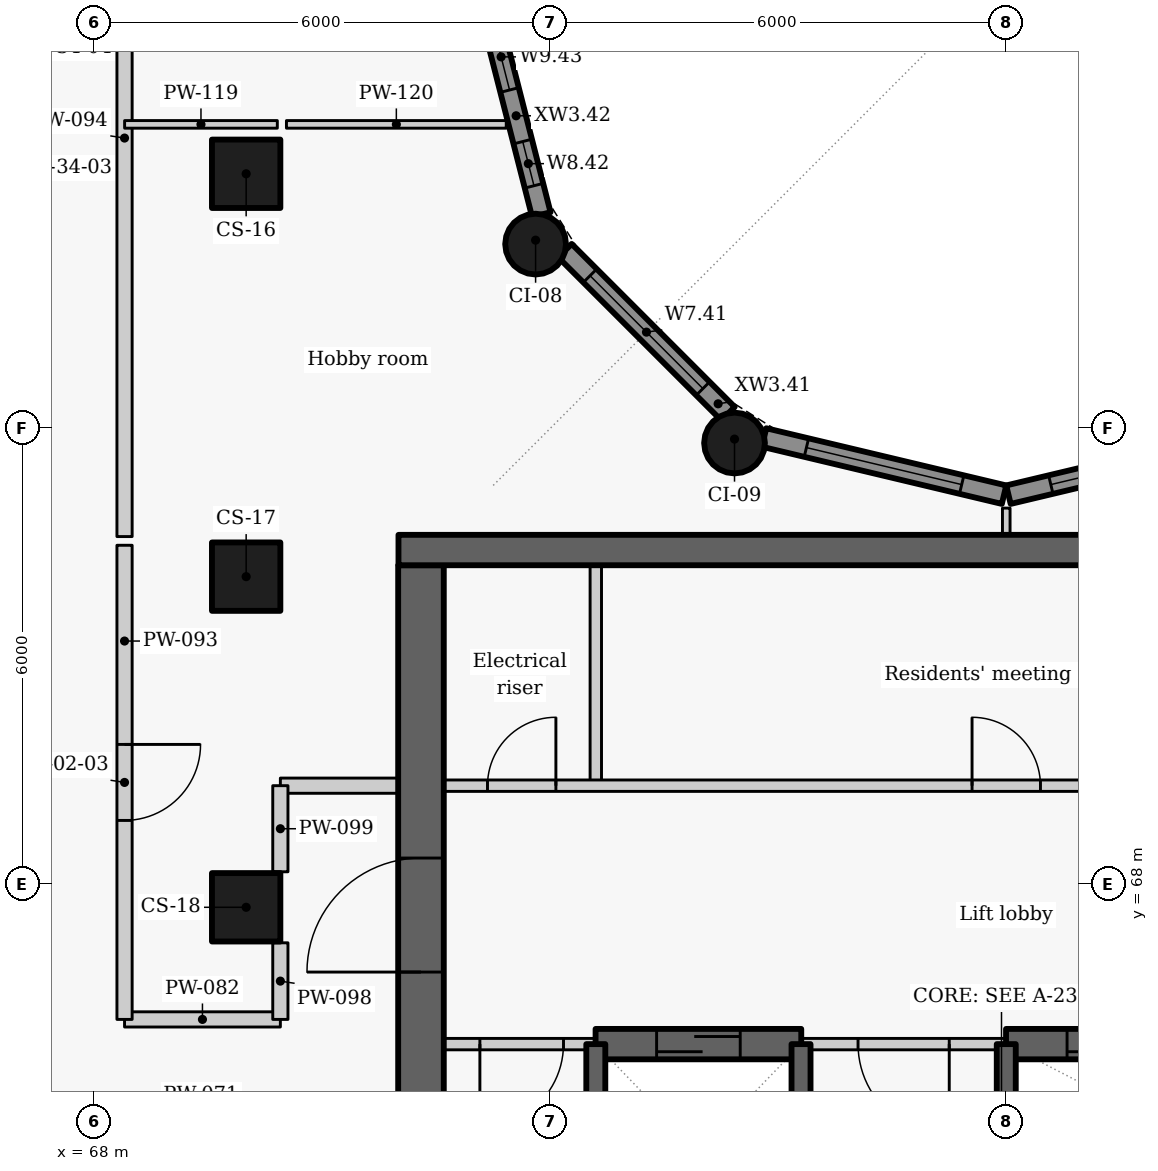
"""IFC4 building model, lengths in metres.
Left out: names, types, materials, properties, quantities, classifications, styles, units other than length and angle.
Written with IfcOpenShell. Run it as: python <this file> out.ifc"""

import sys

from ifc_helpers import new_model, si_unit, direction, frame, frame_2d, origin, origin_2d, place, context, subcontext, project, spatial, rectangle, circle, extrude, element, fill, save


model = new_model("IFC4")
c1 = context("Model", 3, precision=1e-05, world=origin(), true_north=direction((0.0, 1.0)))
c2 = subcontext(c1, "Body", "Model", "MODEL_VIEW")
j1 = project(units=[si_unit("LENGTHUNIT", "METRE"), si_unit("PLANEANGLEUNIT", "RADIAN")], contexts=[c1])
p1 = place(None, origin())
s1 = spatial("IfcSite", under=j1, at=p1, CompositionType="ELEMENT")
p2 = place(p1, origin())
s2 = spatial("IfcBuilding", under=s1, at=p2, CompositionType="ELEMENT")
p3 = place(p2, frame((0.0, 0.0, 216.3)))
s3 = spatial("IfcBuildingStorey", under=s2, at=p3, CompositionType="ELEMENT", Elevation=216.3)
for number, where, z_axis, x_axis in (
    (1, (70.0, 77.35, 0.0), (0.0, 0.0, 1.0), (0.0, -1.0, 0.0)),
    (2, (70.0, 72.05, 0.0), (0.0, 0.0, 1.0), (0.0, -1.0, 0.0)),
    (3, (70.0, 67.7, 0.0), (0.0, 0.0, 1.0), (0.0, -1.0, 0.0)),
):
    element("IfcColumn", number, at=place(p3, frame(where, z_axis=z_axis, x_axis=x_axis)), inside=s3, PredefinedType="COLUMN", context=c2, shape_type="SweptSolid", body=[
        extrude(rectangle(XDim=0.9, YDim=0.9, at=origin_2d()), origin(), (0.0, 0.0, 1.0), 3.3),
    ])
for number, where, z_axis, x_axis in (
    (4, (73.808, 76.425, 0.0), (0.0, 0.0, 1.0), (0.5, -0.866, 0.0)),
    (5, (76.425, 73.808, 0.0), (0.0, 0.0, 1.0), (0.866, -0.5, 0.0)),
):
    element("IfcColumn", number, at=place(p3, frame(where, z_axis=z_axis, x_axis=x_axis)), inside=s3, PredefinedType="COLUMN", context=c2, shape_type="SweptSolid", body=[
        extrude(circle(Radius=0.4, at=origin_2d()), origin(), (0.0, 0.0, 1.0), 3.3),
    ])
p4 = place(p3, frame((83.186, 73.881, 0.0), z_axis=(0.0, 0.0, 1.0), x_axis=(-0.972773113459, -0.231759508395, 0.0)))
e6 = element("IfcWall", 6, at=p4, inside=s3, PredefinedType="SOLIDWALL", context=c2, shape_type="SweptSolid", body=[
    extrude(rectangle(XDim=3.246, YDim=0.25, at=frame_2d((1.623, 0.0))), origin(), (0.0, 0.0, 1.0), 2.05),
])
p5 = place(p4, frame((0.573, 0.0, 0.9)))
e7 = element("IfcOpeningElement", 7, at=p5, cuts=e6, PredefinedType="OPENING", context=c2, shape_type="SweptSolid", body=[
    extrude(rectangle(XDim=2.1, YDim=1.1, at=frame_2d((1.05, 0.55))), frame((0.0, 0.135, 0.0), z_axis=(0.0, -1.0, 0.0), x_axis=(1.0, 0.0, 0.0)), (0.0, 0.0, 1.0), 0.27),
])
p6 = place(p3, frame((79.971, 73.128, 0.0), z_axis=(0.0, 0.0, 1.0), x_axis=(-0.972773113459, 0.231759508395, 0.0)))
e8 = element("IfcWall", 8, at=p6, inside=s3, PredefinedType="SOLIDWALL", context=c2, shape_type="SweptSolid", body=[
    extrude(rectangle(XDim=3.246, YDim=0.25, at=frame_2d((1.623, 0.0))), origin(), (0.0, 0.0, 1.0), 2.05),
])
p7 = place(p6, frame((0.573, 0.0, 0.9)))
e9 = element("IfcOpeningElement", 9, at=p7, cuts=e8, PredefinedType="OPENING", context=c2, shape_type="SweptSolid", body=[
    extrude(rectangle(XDim=2.1, YDim=1.1, at=frame_2d((1.05, 0.55))), frame((0.0, 0.135, 0.0), z_axis=(0.0, -1.0, 0.0), x_axis=(1.0, 0.0, 0.0)), (0.0, 0.0, 1.0), 0.27),
])
p8 = place(p3, frame((76.339, 74.194, 0.0), z_axis=(0.0, 0.0, 1.0), x_axis=(-0.707106781187, 0.707106781187, 0.0)))
e10 = element("IfcWall", 10, at=p8, inside=s3, PredefinedType="SOLIDWALL", context=c2, shape_type="SweptSolid", body=[
    extrude(rectangle(XDim=3.033, YDim=0.25, at=frame_2d((1.517, 0.0))), origin(), (0.0, 0.0, 1.0), 2.05),
])
p9 = place(p8, frame((0.467, 0.0, 0.9)))
e11 = element("IfcOpeningElement", 11, at=p9, cuts=e10, PredefinedType="OPENING", context=c2, shape_type="SweptSolid", body=[
    extrude(rectangle(XDim=2.1, YDim=1.1, at=frame_2d((1.05, 0.55))), frame((0.0, 0.135, 0.0), z_axis=(0.0, -1.0, 0.0), x_axis=(1.0, 0.0, 0.0)), (0.0, 0.0, 1.0), 0.27),
])
p10 = place(p3, frame((73.883, 76.813, 0.0), z_axis=(0.0, 0.0, 1.0), x_axis=(-0.247055971283, 0.969001211069, 0.0)))
e12 = element("IfcWall", 12, at=p10, inside=s3, PredefinedType="SOLIDWALL", context=c2, shape_type="SweptSolid", body=[
    extrude(rectangle(XDim=3.01, YDim=0.25, at=frame_2d((1.505, 0.0))), origin(), (0.0, 0.0, 1.0), 2.05),
])
p11 = place(p10, frame((0.392, 0.0, 0.9)))
e13 = element("IfcOpeningElement", 13, at=p11, cuts=e12, PredefinedType="OPENING", context=c2, shape_type="SweptSolid", body=[
    extrude(rectangle(XDim=0.6, YDim=1.1, at=frame_2d((0.3, 0.55))), frame((0.0, 0.135, 0.0), z_axis=(0.0, -1.0, 0.0), x_axis=(1.0, 0.0, 0.0)), (0.0, 0.0, 1.0), 0.27),
])
p12 = place(p10, frame((1.691, 0.0, 0.9)))
e14 = element("IfcOpeningElement", 14, at=p12, cuts=e12, PredefinedType="OPENING", context=c2, shape_type="SweptSolid", body=[
    extrude(rectangle(XDim=0.9, YDim=1.1, at=frame_2d((0.45, 0.55))), frame((0.0, 0.135, 0.0), z_axis=(0.0, -1.0, 0.0), x_axis=(1.0, 0.0, 0.0)), (0.0, 0.0, 1.0), 0.27),
])
p13 = place(p3, frame((74.6, 69.3, 0.0), z_axis=(0.0, 0.0, 1.0), x_axis=(0.0, 1.0, 0.0)))
e15 = element("IfcWall", 15, at=p13, inside=s3, PredefinedType="PARTITIONING", context=c2, shape_type="SweptSolid", body=[
    extrude(rectangle(XDim=2.9, YDim=0.15, at=frame_2d((1.45, 0.0))), origin(), (0.0, 0.0, 1.0), 2.95),
])
p14 = place(p3, frame((72.0, 69.3, 0.0), z_axis=(0.0, 0.0, 1.0), x_axis=(1.0, 0.0, 0.0)))
e16 = element("IfcWall", 16, at=p14, inside=s3, PredefinedType="PARTITIONING", context=c2, shape_type="SweptSolid", body=[
    extrude(rectangle(XDim=13.4, YDim=0.15, at=frame_2d((6.7, 0.0))), origin(), (0.0, 0.0, 1.0), 2.95),
])
p15 = place(p14, frame((1.175, 0.0, 0.0)))
e17 = element("IfcOpeningElement", 17, at=p15, cuts=e16, PredefinedType="OPENING", context=c2, shape_type="SweptSolid", body=[
    extrude(rectangle(XDim=0.9, YDim=2.1, at=frame_2d((0.45, 1.05))), frame((0.0, 0.085, 0.0), z_axis=(0.0, -1.0, 0.0), x_axis=(1.0, 0.0, 0.0)), (0.0, 0.0, 1.0), 0.17),
])
p16 = place(p14, frame((7.55, 0.0, 0.0)))
e18 = element("IfcOpeningElement", 18, at=p16, cuts=e16, PredefinedType="OPENING", context=c2, shape_type="SweptSolid", body=[
    extrude(rectangle(XDim=0.9, YDim=2.1, at=frame_2d((0.45, 1.05))), frame((0.0, 0.085, 0.0), z_axis=(0.0, -1.0, 0.0), x_axis=(1.0, 0.0, 0.0)), (0.0, 0.0, 1.0), 0.17),
])
p17 = place(p3, frame((72.3, 63.1, -0.275), z_axis=(0.0, 0.0, 1.0), x_axis=(0.0, 1.0, 0.0)))
e19 = element("IfcWall", 19, at=p17, inside=s3, PredefinedType="SHEAR", context=c2, shape_type="SweptSolid", body=[
    extrude(rectangle(XDim=9.1, YDim=0.6, at=frame_2d((4.55, 0.0))), origin(), (0.0, 0.0, 1.0), 3.225),
])
p18 = place(p17, frame((3.748, 0.0, 0.275)))
e20 = element("IfcOpeningElement", 20, at=p18, cuts=e19, PredefinedType="OPENING", context=c2, shape_type="SweptSolid", body=[
    extrude(rectangle(XDim=1.5, YDim=2.1, at=frame_2d((0.75, 1.05))), frame((0.0, 0.31, 0.0), z_axis=(0.0, -1.0, 0.0), x_axis=(1.0, 0.0, 0.0)), (0.0, 0.0, 1.0), 0.62),
])
p19 = place(p3, frame((74.603, 65.9, 0.0), z_axis=(0.0, 0.0, 1.0), x_axis=(-1.0, 0.0, 0.0)))
e21 = element("IfcWall", 21, at=p19, inside=s3, PredefinedType="PARTITIONING", context=c2, shape_type="SweptSolid", body=[
    extrude(rectangle(XDim=2.603, YDim=0.15, at=frame_2d((1.302, 0.0))), origin(), (0.0, 0.0, 1.0), 2.95),
])
p20 = place(p19, frame((0.428, 0.0, 0.0)))
e22 = element("IfcOpeningElement", 22, at=p20, cuts=e21, PredefinedType="OPENING", context=c2, shape_type="SweptSolid", body=[
    extrude(rectangle(XDim=1.1, YDim=2.1, at=frame_2d((0.55, 1.05))), frame((0.0, 0.085, 0.0), z_axis=(0.0, -1.0, 0.0), x_axis=(1.0, 0.0, 0.0)), (0.0, 0.0, 1.0), 0.17),
])
p21 = place(p3, frame((80.003, 65.9, 0.0), z_axis=(0.0, 0.0, 1.0), x_axis=(-1.0, 0.0, 0.0)))
e23 = element("IfcWall", 23, at=p21, inside=s3, PredefinedType="PARTITIONING", context=c2, shape_type="SweptSolid", body=[
    extrude(rectangle(XDim=2.706, YDim=0.15, at=frame_2d((1.353, 0.0))), origin(), (0.0, 0.0, 1.0), 2.95),
])
p22 = place(p21, frame((0.753, 0.0, 0.0)))
e24 = element("IfcOpeningElement", 24, at=p22, cuts=e23, PredefinedType="OPENING", context=c2, shape_type="SweptSolid", body=[
    extrude(rectangle(XDim=1.2, YDim=2.1, at=frame_2d((0.6, 1.05))), frame((0.0, 0.085, 0.0), z_axis=(0.0, -1.0, 0.0), x_axis=(1.0, 0.0, 0.0)), (0.0, 0.0, 1.0), 0.17),
])
p23 = place(p3, frame((74.597, 65.9, -0.275), z_axis=(0.0, 0.0, 1.0), x_axis=(1.0, 0.0, 0.0)))
e25 = element("IfcWall", 25, at=p23, inside=s3, PredefinedType="SHEAR", context=c2, shape_type="SweptSolid", body=[
    extrude(rectangle(XDim=2.706, YDim=0.4, at=frame_2d((1.353, 0.0))), origin(), (0.0, 0.0, 1.0), 3.225),
])
p24 = place(p23, frame((0.803, 0.0, 0.275)))
e26 = element("IfcOpeningElement", 26, at=p24, cuts=e25, PredefinedType="OPENING", context=c2, shape_type="SweptSolid", body=[
    extrude(rectangle(XDim=1.1, YDim=2.1, at=frame_2d((0.55, 1.05))), frame((0.0, 0.21, 0.0), z_axis=(0.0, -1.0, 0.0), x_axis=(1.0, 0.0, 0.0)), (0.0, 0.0, 1.0), 0.42),
])
p25 = place(p3, frame((79.997, 65.9, -0.275), z_axis=(0.0, 0.0, 1.0), x_axis=(1.0, 0.0, 0.0)))
e27 = element("IfcWall", 27, at=p25, inside=s3, PredefinedType="SHEAR", context=c2, shape_type="SweptSolid", body=[
    extrude(rectangle(XDim=5.406, YDim=0.4, at=frame_2d((2.703, 0.0))), origin(), (0.0, 0.0, 1.0), 3.225),
])
p26 = place(p25, frame((0.803, 0.0, 0.275)))
e28 = element("IfcOpeningElement", 28, at=p26, cuts=e27, PredefinedType="OPENING", context=c2, shape_type="SweptSolid", body=[
    extrude(rectangle(XDim=1.1, YDim=2.1, at=frame_2d((0.55, 1.05))), frame((0.0, 0.21, 0.0), z_axis=(0.0, -1.0, 0.0), x_axis=(1.0, 0.0, 0.0)), (0.0, 0.0, 1.0), 0.42),
])
for number, where, z_axis, x_axis in (
    (29, (74.6, 63.1, -0.275), (0.0, 0.0, 1.0), (0.0, 1.0, 0.0)),
    (30, (77.3, 63.1, -0.275), (0.0, 0.0, 1.0), (0.0, 1.0, 0.0)),
    (31, (80.0, 63.1, -0.275), (0.0, 0.0, 1.0), (0.0, 1.0, 0.0)),
):
    element("IfcWall", number, at=place(p3, frame(where, z_axis=z_axis, x_axis=x_axis)), inside=s3, PredefinedType="SHEAR", context=c2, shape_type="SweptSolid", body=[
        extrude(rectangle(XDim=2.8, YDim=0.25, at=frame_2d((1.4, 0.0))), origin(), (0.0, 0.0, 1.0), 3.225),
    ])
p27 = place(p3, frame((70.45, 69.3, 0.0), z_axis=(0.0, 0.0, 1.0), x_axis=(1.0, 0.0, 0.0)))
e32 = element("IfcWall", 32, at=p27, inside=s3, PredefinedType="PARTITIONING", context=c2, shape_type="SweptSolid", body=[
    extrude(rectangle(XDim=1.55, YDim=0.2, at=frame_2d((0.775, 0.0))), origin(), (0.0, 0.0, 1.0), 2.95),
])
p28 = place(p3, frame((68.4, 66.225, 0.0), z_axis=(0.0, 0.0, 1.0), x_axis=(1.0, 0.0, 0.0)))
e33 = element("IfcWall", 33, at=p28, inside=s3, PredefinedType="PARTITIONING", context=c2, shape_type="SweptSolid", body=[
    extrude(rectangle(XDim=2.05, YDim=0.2, at=frame_2d((1.025, 0.0))), origin(), (0.0, 0.0, 1.0), 2.43),
])
p29 = place(p3, frame((68.4, 72.463, 0.0), z_axis=(0.0, 0.0, 1.0), x_axis=(0.0, -1.0, 0.0)))
e34 = element("IfcWall", 34, at=p29, inside=s3, PredefinedType="PARTITIONING", context=c2, shape_type="SweptSolid", body=[
    extrude(rectangle(XDim=6.238, YDim=0.2, at=frame_2d((3.119, 0.0))), origin(), (0.0, 0.0, 1.0), 2.95),
])
p30 = place(p29, frame((2.62, 0.0, 0.0)))
e35 = element("IfcOpeningElement", 35, at=p30, cuts=e34, PredefinedType="OPENING", context=c2, shape_type="SweptSolid", body=[
    extrude(rectangle(XDim=1.0, YDim=2.1, at=frame_2d((0.5, 1.05))), frame((0.0, 0.11, 0.0), z_axis=(0.0, -1.0, 0.0), x_axis=(1.0, 0.0, 0.0)), (0.0, 0.0, 1.0), 0.22),
])
p31 = place(p3, frame((68.4, 72.577, 0.0), z_axis=(0.0, 0.0, 1.0), x_axis=(0.0, 1.0, 0.0)))
e36 = element("IfcWall", 36, at=p31, inside=s3, PredefinedType="PARTITIONING", context=c2, shape_type="SweptSolid", body=[
    extrude(rectangle(XDim=10.486, YDim=0.2, at=frame_2d((5.243, 0.0))), origin(), (0.0, 0.0, 1.0), 2.95),
])
p32 = place(p3, frame((70.45, 66.225, 0.0), z_axis=(0.0, 0.0, 1.0), x_axis=(0.0, 1.0, 0.0)))
e37 = element("IfcWall", 37, at=p32, inside=s3, PredefinedType="PARTITIONING", context=c2, shape_type="SweptSolid", body=[
    extrude(rectangle(XDim=1.008, YDim=0.2, at=frame_2d((0.504, 0.0))), origin(), (0.0, 0.0, 1.0), 2.43),
])
p33 = place(p3, frame((70.45, 68.167, 0.0), z_axis=(0.0, 0.0, 1.0), x_axis=(0.0, 1.0, 0.0)))
e38 = element("IfcWall", 38, at=p33, inside=s3, PredefinedType="PARTITIONING", context=c2, shape_type="SweptSolid", body=[
    extrude(rectangle(XDim=1.133, YDim=0.2, at=frame_2d((0.566, 0.0))), origin(), (0.0, 0.0, 1.0), 2.43),
])
p34 = place(p3, frame((80.0, 72.6, 0.0), z_axis=(0.0, 0.0, 1.0), x_axis=(0.0, 1.0, 0.0)))
e39 = element("IfcWall", 39, at=p34, inside=s3, PredefinedType="PARTITIONING", context=c2, shape_type="SweptSolid", body=[
    extrude(rectangle(XDim=0.352, YDim=0.1, at=frame_2d((0.176, 0.0))), origin(), (0.0, 0.0, 1.0), 2.95),
])
p35 = place(p3, frame((68.401, 78.0, 0.0), z_axis=(0.0, 0.0, 1.0), x_axis=(1.0, 0.0, 0.0)))
e40 = element("IfcWall", 40, at=p35, inside=s3, PredefinedType="PARTITIONING", context=c2, shape_type="SweptSolid", body=[
    extrude(rectangle(XDim=2.009, YDim=0.1, at=frame_2d((1.004, 0.0))), origin(), (0.0, 0.0, 1.0), 2.43),
])
p36 = place(p3, frame((70.53, 78.0, 0.0), z_axis=(0.0, 0.0, 1.0), x_axis=(1.0, 0.0, 0.0)))
e41 = element("IfcWall", 41, at=p36, inside=s3, PredefinedType="PARTITIONING", context=c2, shape_type="SweptSolid", body=[
    extrude(rectangle(XDim=2.892, YDim=0.1, at=frame_2d((1.446, 0.0))), origin(), (0.0, 0.0, 1.0), 2.95),
])
p37 = place(p3, frame((72.004, 72.4, -0.275), z_axis=(0.0, 0.0, 1.0), x_axis=(1.0, 0.0, 0.0)))
e42 = element("IfcWall", 42, at=p37, inside=s3, PredefinedType="SHEAR", context=c2, shape_type="SweptSolid", body=[
    extrude(rectangle(XDim=15.992, YDim=0.4, at=frame_2d((7.996, 0.0))), origin(), (0.0, 0.0, 1.0), 3.225),
])
p38 = place(p5, origin())
e43 = element("IfcWindow", 43, at=p38, inside=s3, PartitioningType="SINGLE_PANEL", PredefinedType="WINDOW", context=c2, shape_type="SweptSolid", body=[
    extrude(rectangle(XDim=2.1, YDim=1.1, at=frame_2d((1.05, 0.55))), frame((0.0, 0.03, 0.0), z_axis=(0.0, -1.0, 0.0), x_axis=(1.0, 0.0, 0.0)), (0.0, 0.0, 1.0), 0.06),
])
fill(e7, e43)
p39 = place(p7, origin())
e44 = element("IfcWindow", 44, at=p39, inside=s3, PartitioningType="SINGLE_PANEL", PredefinedType="WINDOW", context=c2, shape_type="SweptSolid", body=[
    extrude(rectangle(XDim=2.1, YDim=1.1, at=frame_2d((1.05, 0.55))), frame((0.0, 0.03, 0.0), z_axis=(0.0, -1.0, 0.0), x_axis=(1.0, 0.0, 0.0)), (0.0, 0.0, 1.0), 0.06),
])
fill(e9, e44)
p40 = place(p9, origin())
e45 = element("IfcWindow", 45, at=p40, inside=s3, PartitioningType="SINGLE_PANEL", PredefinedType="WINDOW", context=c2, shape_type="SweptSolid", body=[
    extrude(rectangle(XDim=2.1, YDim=1.1, at=frame_2d((1.05, 0.55))), frame((0.0, 0.03, 0.0), z_axis=(0.0, -1.0, 0.0), x_axis=(1.0, 0.0, 0.0)), (0.0, 0.0, 1.0), 0.06),
])
fill(e11, e45)
p41 = place(p11, origin())
e46 = element("IfcWindow", 46, at=p41, inside=s3, PartitioningType="SINGLE_PANEL", PredefinedType="WINDOW", context=c2, shape_type="SweptSolid", body=[
    extrude(rectangle(XDim=0.6, YDim=1.1, at=frame_2d((0.3, 0.55))), frame((0.0, 0.03, 0.0), z_axis=(0.0, -1.0, 0.0), x_axis=(1.0, 0.0, 0.0)), (0.0, 0.0, 1.0), 0.06),
])
fill(e13, e46)
p42 = place(p12, origin())
e47 = element("IfcWindow", 47, at=p42, inside=s3, PartitioningType="SINGLE_PANEL", PredefinedType="WINDOW", context=c2, shape_type="SweptSolid", body=[
    extrude(rectangle(XDim=0.9, YDim=1.1, at=frame_2d((0.45, 0.55))), frame((0.0, 0.03, 0.0), z_axis=(0.0, -1.0, 0.0), x_axis=(1.0, 0.0, 0.0)), (0.0, 0.0, 1.0), 0.06),
])
fill(e14, e47)
p43 = place(p15, origin())
e48 = element("IfcDoor", 48, at=p43, inside=s3, OperationType="SINGLE_SWING_RIGHT", PredefinedType="DOOR", context=c2, shape_type="SweptSolid", body=[
    extrude(rectangle(XDim=0.9, YDim=2.1, at=frame_2d((0.45, 1.05))), frame((0.0, 0.025, 0.0), z_axis=(0.0, -1.0, 0.0), x_axis=(1.0, 0.0, 0.0)), (0.0, 0.0, 1.0), 0.05),
])
fill(e17, e48)
p44 = place(p16, origin())
e49 = element("IfcDoor", 49, at=p44, inside=s3, OperationType="SINGLE_SWING_LEFT", PredefinedType="DOOR", context=c2, shape_type="SweptSolid", body=[
    extrude(rectangle(XDim=0.9, YDim=2.1, at=frame_2d((0.45, 1.05))), frame((0.0, 0.025, 0.0), z_axis=(0.0, -1.0, 0.0), x_axis=(1.0, 0.0, 0.0)), (0.0, 0.0, 1.0), 0.05),
])
fill(e18, e49)
p45 = place(p20, origin())
e50 = element("IfcDoor", 50, at=p45, inside=s3, OperationType="SINGLE_SWING_RIGHT", PredefinedType="DOOR", context=c2, shape_type="SweptSolid", body=[
    extrude(rectangle(XDim=1.1, YDim=2.1, at=frame_2d((0.55, 1.05))), frame((0.0, 0.025, 0.0), z_axis=(0.0, -1.0, 0.0), x_axis=(1.0, 0.0, 0.0)), (0.0, 0.0, 1.0), 0.05),
])
fill(e22, e50)
p46 = place(p24, origin())
e51 = element("IfcDoor", 51, at=p46, inside=s3, OperationType="SLIDING_TO_LEFT", PredefinedType="DOOR", context=c2, shape_type="SweptSolid", body=[
    extrude(rectangle(XDim=1.1, YDim=2.1, at=frame_2d((0.55, 1.05))), frame((0.0, 0.025, 0.0), z_axis=(0.0, -1.0, 0.0), x_axis=(1.0, 0.0, 0.0)), (0.0, 0.0, 1.0), 0.05),
])
fill(e26, e51)
p47 = place(p22, origin())
e52 = element("IfcDoor", 52, at=p47, inside=s3, OperationType="DOUBLE_DOOR_SINGLE_SWING", PredefinedType="DOOR", context=c2, shape_type="SweptSolid", body=[
    extrude(rectangle(XDim=1.2, YDim=2.1, at=frame_2d((0.6, 1.05))), frame((0.0, 0.025, 0.0), z_axis=(0.0, -1.0, 0.0), x_axis=(1.0, 0.0, 0.0)), (0.0, 0.0, 1.0), 0.05),
])
fill(e24, e52)
p48 = place(p26, origin())
e53 = element("IfcDoor", 53, at=p48, inside=s3, OperationType="SLIDING_TO_LEFT", PredefinedType="DOOR", context=c2, shape_type="SweptSolid", body=[
    extrude(rectangle(XDim=1.1, YDim=2.1, at=frame_2d((0.55, 1.05))), frame((0.0, 0.025, 0.0), z_axis=(0.0, -1.0, 0.0), x_axis=(1.0, 0.0, 0.0)), (0.0, 0.0, 1.0), 0.05),
])
fill(e28, e53)
p49 = place(p30, origin())
e54 = element("IfcDoor", 54, at=p49, inside=s3, OperationType="SINGLE_SWING_LEFT", PredefinedType="DOOR", context=c2, shape_type="SweptSolid", body=[
    extrude(rectangle(XDim=1.0, YDim=2.1, at=frame_2d((0.5, 1.05))), frame((0.0, 0.025, 0.0), z_axis=(0.0, -1.0, 0.0), x_axis=(1.0, 0.0, 0.0)), (0.0, 0.0, 1.0), 0.05),
])
fill(e35, e54)
p50 = place(p18, origin())
e55 = element("IfcDoor", 55, at=p50, inside=s3, OperationType="DOUBLE_DOOR_SINGLE_SWING", PredefinedType="DOOR", context=c2, shape_type="SweptSolid", body=[
    extrude(rectangle(XDim=1.5, YDim=2.1, at=frame_2d((0.75, 1.05))), frame((0.0, 0.025, 0.0), z_axis=(0.0, -1.0, 0.0), x_axis=(1.0, 0.0, 0.0)), (0.0, 0.0, 1.0), 0.05),
])
fill(e20, e55)
save(model, sys.argv[1])
